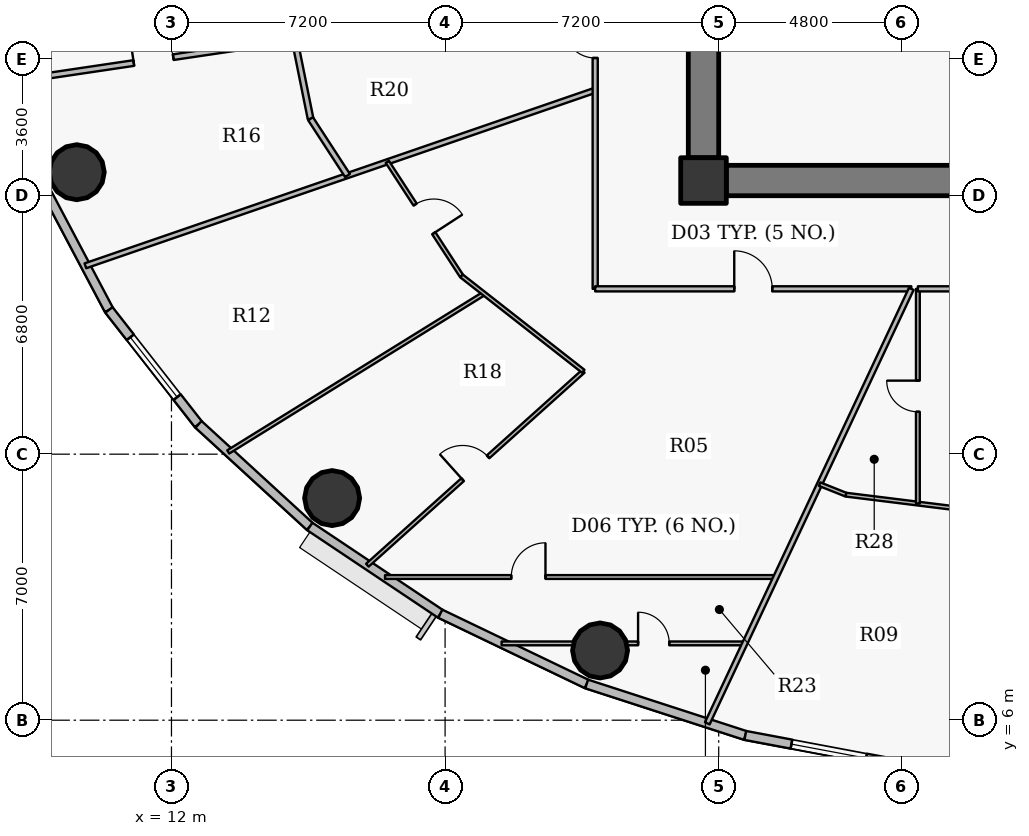
"""IFC4 building model, lengths in metres.
Left out: names, types, materials, properties, quantities, classifications, styles, units other than length and angle.
Written with IfcOpenShell. Run it as: python <this file> out.ifc"""

import sys

from ifc_helpers import new_model, si_unit, direction, frame, frame_2d, origin, origin_2d, place, context, subcontext, project, spatial, rectangle, hollow_circle, extrude, source, transform, mapped, element, fill, save


model = new_model("IFC4")
c1 = context("Model", 3, precision=1e-05, world=origin(), true_north=direction((0.0, 1.0)))
c2 = subcontext(c1, "Body", "Model", "MODEL_VIEW")
j1 = project(units=[si_unit("LENGTHUNIT", "METRE"), si_unit("PLANEANGLEUNIT", "RADIAN")], contexts=[c1])
p1 = place(None, origin())
s1 = spatial("IfcSite", under=j1, at=p1, CompositionType="ELEMENT")
p2 = place(p1, origin())
s2 = spatial("IfcBuilding", under=s1, at=p2, CompositionType="ELEMENT")
p3 = place(p2, frame((0.0, 0.0, 138.45)))
s3 = spatial("IfcBuildingStorey", under=s2, at=p3, CompositionType="ELEMENT", Elevation=138.45)
p4 = place(p3, frame((26.0, 20.2, 0.0), z_axis=(0.0, 0.0, 1.0), x_axis=(1.0, 0.0, 0.0)))
e1 = element("IfcColumn", 1, at=p4, inside=s3, PredefinedType="COLUMN", context=c2, shape_type="SweptSolid", body=[
    extrude(rectangle(XDim=1.2, YDim=1.2, at=origin_2d()), origin(), (0.0, 0.0, 1.0), 3.75),
])
p5 = place(p3, frame((45.4, 20.2, 0.0), z_axis=(0.0, 0.0, 1.0), x_axis=(-1.0, 0.0, 0.0)))
e2 = element("IfcWall", 2, at=p5, inside=s3, PredefinedType="SHEAR", context=c2, shape_type="SweptSolid", body=[
    extrude(rectangle(XDim=18.8, YDim=0.8, at=frame_2d((9.4, 0.0))), origin(), (0.0, 0.0, 1.0), 2.95),
])
p6 = place(p5, frame((10.15, 0.0, 0.0)))
e3 = element("IfcOpeningElement", 3, at=p6, cuts=e2, PredefinedType="OPENING", context=c2, shape_type="SweptSolid", body=[
    extrude(rectangle(XDim=1.15, YDim=2.15, at=origin_2d()), frame((0.575, 0.41, 1.075), z_axis=(0.0, -1.0, 0.0), x_axis=(1.0, 0.0, 0.0)), (0.0, 0.0, 1.0), 0.82),
])
p7 = place(p3, frame((26.0, 20.8, 0.0), z_axis=(0.0, 0.0, 1.0), x_axis=(0.0, 1.0, 0.0)))
e4 = element("IfcWall", 4, at=p7, inside=s3, PredefinedType="SHEAR", context=c2, shape_type="SweptSolid", body=[
    extrude(rectangle(XDim=12.4, YDim=0.8, at=frame_2d((6.2, 0.0))), origin(), (0.0, 0.0, 1.0), 2.95),
])
p8 = place(p7, frame((5.79, 0.0, 0.0)))
e5 = element("IfcOpeningElement", 5, at=p8, cuts=e4, PredefinedType="OPENING", context=c2, shape_type="SweptSolid", body=[
    extrude(rectangle(XDim=0.82, YDim=2.1, at=origin_2d()), frame((0.41, 0.41, 1.05), z_axis=(0.0, -1.0, 0.0), x_axis=(1.0, 0.0, 0.0)), (0.0, 0.0, 1.0), 0.82),
])
for number, where, z_axis, x_axis in (
    (6, (9.507, 20.419, 0.0), (0.0, 0.0, 1.0), (1.0, 0.0, 0.0)),
    (7, (16.227, 11.844, 0.0), (0.0, 0.0, 1.0), (1.0, 0.0, 0.0)),
    (8, (23.278, 7.835, 0.0), (0.0, 0.0, 1.0), (1.0, 0.0, 0.0)),
):
    element("IfcColumn", number, at=place(p3, frame(where, z_axis=z_axis, x_axis=x_axis)), inside=s3, PredefinedType="COLUMN", context=c2, shape_type="SweptSolid", body=[
        extrude(hollow_circle(Radius=0.725, WallThickness=0.042, at=origin_2d()), origin(), (0.0, 0.0, 1.0), 3.75),
    ])
p9 = place(p3, frame((10.355, 16.794, 0.0), z_axis=(0.0, 0.0, 1.0), x_axis=(-0.467614004126, 0.883932770716, 0.0)))
e9 = element("IfcWall", 9, at=p9, inside=s3, PredefinedType="SOLIDWALL", context=c2, shape_type="SweptSolid", body=[
    extrude(rectangle(XDim=3.689, YDim=0.24, at=frame_2d((1.844, 0.0))), origin(), (0.0, 0.0, 1.0), 3.5),
])
p10 = place(p3, frame((12.711, 13.783, 0.0), z_axis=(0.0, 0.0, 1.0), x_axis=(-0.616272103517, 0.787533297345, 0.0)))
e10 = element("IfcWall", 10, at=p10, inside=s3, PredefinedType="SOLIDWALL", context=c2, shape_type="SweptSolid", body=[
    extrude(rectangle(XDim=3.823, YDim=0.24, at=frame_2d((1.912, 0.0))), origin(), (0.0, 0.0, 1.0), 3.5),
])
p11 = place(p10, frame((0.912, 0.0, 0.9)))
e11 = element("IfcOpeningElement", 11, at=p11, cuts=e10, PredefinedType="OPENING", context=c2, shape_type="SweptSolid", body=[
    extrude(rectangle(XDim=2.0, YDim=1.75, at=origin_2d()), frame((1.0, 0.13, 0.875), z_axis=(0.0, -1.0, 0.0), x_axis=(1.0, 0.0, 0.0)), (0.0, 0.0, 1.0), 0.26),
])
p12 = place(p3, frame((15.642, 11.097, 0.0), z_axis=(0.0, 0.0, 1.0), x_axis=(-0.737113356241, 0.675769117414, 0.0)))
e12 = element("IfcWall", 12, at=p12, inside=s3, PredefinedType="SOLIDWALL", context=c2, shape_type="SweptSolid", body=[
    extrude(rectangle(XDim=3.976, YDim=0.24, at=frame_2d((1.988, 0.0))), origin(), (0.0, 0.0, 1.0), 3.5),
])
p13 = place(p3, frame((19.075, 8.801, 0.0), z_axis=(0.0, 0.0, 1.0), x_axis=(-0.831221811447, 0.555940914284, 0.0)))
e13 = element("IfcWall", 13, at=p13, inside=s3, PredefinedType="SOLIDWALL", context=c2, shape_type="SweptSolid", body=[
    extrude(rectangle(XDim=4.13, YDim=0.24, at=frame_2d((2.065, 0.0))), origin(), (0.0, 0.0, 1.0), 3.5),
])
p14 = place(p3, frame((22.926, 6.953, 0.0), z_axis=(0.0, 0.0, 1.0), x_axis=(-0.901589935876, 0.432591709962, 0.0)))
e14 = element("IfcWall", 14, at=p14, inside=s3, PredefinedType="SOLIDWALL", context=c2, shape_type="SweptSolid", body=[
    extrude(rectangle(XDim=4.272, YDim=0.24, at=frame_2d((2.136, 0.0))), origin(), (0.0, 0.0, 1.0), 3.5),
])
p15 = place(p3, frame((27.1, 5.599, 0.0), z_axis=(0.0, 0.0, 1.0), x_axis=(-0.951211346073, 0.308540070495, 0.0)))
e15 = element("IfcWall", 15, at=p15, inside=s3, PredefinedType="SOLIDWALL", context=c2, shape_type="SweptSolid", body=[
    extrude(rectangle(XDim=4.388, YDim=0.24, at=frame_2d((2.194, 0.0))), origin(), (0.0, 0.0, 1.0), 3.5),
])
p16 = place(p3, frame((31.494, 4.773, 0.0), z_axis=(0.0, 0.0, 1.0), x_axis=(-0.982789252177, 0.184730305596, 0.0)))
e16 = element("IfcWall", 16, at=p16, inside=s3, PredefinedType="SOLIDWALL", context=c2, shape_type="SweptSolid", body=[
    extrude(rectangle(XDim=4.471, YDim=0.24, at=frame_2d((2.235, 0.0))), origin(), (0.0, 0.0, 1.0), 3.5),
])
p17 = place(p16, frame((1.236, 0.0, 0.9)))
e17 = element("IfcOpeningElement", 17, at=p17, cuts=e16, PredefinedType="OPENING", context=c2, shape_type="SweptSolid", body=[
    extrude(rectangle(XDim=2.0, YDim=1.75, at=origin_2d()), frame((1.0, 0.13, 0.875), z_axis=(0.0, -1.0, 0.0), x_axis=(1.0, 0.0, 0.0)), (0.0, 0.0, 1.0), 0.26),
])
p18 = place(p3, frame((7.779, 22.812, 0.0), z_axis=(0.0, 0.0, 1.0), x_axis=(0.989169524168, 0.146777561148, 0.0)))
e18 = element("IfcWall", 18, at=p18, inside=s3, PredefinedType="PARTITIONING", context=c2, shape_type="SweptSolid", body=[
    extrude(rectangle(XDim=15.539, YDim=0.15, at=frame_2d((7.77, 0.0))), origin(), (0.0, 0.0, 1.0), 2.935),
])
p19 = place(p18, frame((3.265, 0.0, 0.0)))
e19 = element("IfcOpeningElement", 19, at=p19, cuts=e18, PredefinedType="OPENING", context=c2, shape_type="SweptSolid", body=[
    extrude(rectangle(XDim=1.05, YDim=2.15, at=origin_2d()), frame((0.525, 0.085, 1.075), z_axis=(0.0, -1.0, 0.0), x_axis=(1.0, 0.0, 0.0)), (0.0, 0.0, 1.0), 0.17),
])
p20 = place(p3, frame((9.735, 17.956, 0.0), z_axis=(0.0, 0.0, 1.0), x_axis=(0.945515704768, 0.325576491836, 0.0)))
e20 = element("IfcWall", 20, at=p20, inside=s3, PredefinedType="PARTITIONING", context=c2, shape_type="SweptSolid", body=[
    extrude(rectangle(XDim=14.188, YDim=0.135, at=frame_2d((7.094, 0.0))), origin(), (0.0, 0.0, 1.0), 2.935),
])
p21 = place(p3, frame((13.494, 13.059, 0.0), z_axis=(0.0, 0.0, 1.0), x_axis=(0.850110644983, 0.526604112486, 0.0)))
e21 = element("IfcWall", 21, at=p21, inside=s3, PredefinedType="PARTITIONING", context=c2, shape_type="SweptSolid", body=[
    extrude(rectangle(XDim=7.916, YDim=0.1, at=frame_2d((3.958, 0.0))), origin(), (0.0, 0.0, 1.0), 2.935),
])
p22 = place(p3, frame((15.237, 23.919, 0.0), z_axis=(0.0, 0.0, 1.0), x_axis=(0.198269330309, -0.98014757698, 0.0)))
e22 = element("IfcWall", 22, at=p22, inside=s3, PredefinedType="PARTITIONING", context=c2, shape_type="SweptSolid", body=[
    extrude(rectangle(XDim=2.136, YDim=0.15, at=frame_2d((1.068, 0.0))), origin(), (0.0, 0.0, 1.0), 2.935),
])
p23 = place(p3, frame((15.661, 21.825, 0.0), z_axis=(0.0, 0.0, 1.0), x_axis=(0.54543603077, -0.838152454114, 0.0)))
e23 = element("IfcWall", 23, at=p23, inside=s3, PredefinedType="PARTITIONING", context=c2, shape_type="SweptSolid", body=[
    extrude(rectangle(XDim=1.782, YDim=0.15, at=frame_2d((0.891, 0.0))), origin(), (0.0, 0.0, 1.0), 2.935),
])
p24 = place(p3, frame((17.155, 10.078, 0.0), z_axis=(0.0, 0.0, 1.0), x_axis=(0.744051955022, 0.668121761528, 0.0)))
e24 = element("IfcWall", 24, at=p24, inside=s3, PredefinedType="PARTITIONING", context=c2, shape_type="SweptSolid", body=[
    extrude(rectangle(XDim=7.636, YDim=0.1, at=frame_2d((3.818, 0.0))), origin(), (0.0, 0.0, 1.0), 2.935),
])
p25 = place(p24, frame((3.368, 0.0, 0.0)))
e25 = element("IfcOpeningElement", 25, at=p25, cuts=e24, PredefinedType="OPENING", context=c2, shape_type="SweptSolid", body=[
    extrude(rectangle(XDim=0.9, YDim=2.1, at=origin_2d()), frame((0.45, 0.06, 1.05), z_axis=(0.0, -1.0, 0.0), x_axis=(1.0, 0.0, 0.0)), (0.0, 0.0, 1.0), 0.12),
])
p26 = place(p3, frame((17.62, 9.768, 0.0), z_axis=(0.0, 0.0, 1.0), x_axis=(1.0, 0.0, 0.0)))
e26 = element("IfcWall", 26, at=p26, inside=s3, PredefinedType="PARTITIONING", context=c2, shape_type="SweptSolid", body=[
    extrude(rectangle(XDim=10.288, YDim=0.1, at=frame_2d((5.144, 0.0))), origin(), (0.0, 0.0, 1.0), 2.935),
])
p27 = place(p26, frame((3.322, 0.0, 0.0)))
e27 = element("IfcOpeningElement", 27, at=p27, cuts=e26, PredefinedType="OPENING", context=c2, shape_type="SweptSolid", body=[
    extrude(rectangle(XDim=0.9, YDim=2.1, at=origin_2d()), frame((0.45, 0.06, 1.05), z_axis=(0.0, -1.0, 0.0), x_axis=(1.0, 0.0, 0.0)), (0.0, 0.0, 1.0), 0.12),
])
p28 = place(p3, frame((17.68, 20.692, 0.0), z_axis=(0.0, 0.0, 1.0), x_axis=(0.545371539428, -0.838194418964, 0.0)))
e28 = element("IfcWall", 28, at=p28, inside=s3, PredefinedType="PARTITIONING", context=c2, shape_type="SweptSolid", body=[
    extrude(rectangle(XDim=3.583, YDim=0.1, at=frame_2d((1.791, 0.0))), origin(), (0.0, 0.0, 1.0), 3.5),
])
p29 = place(p28, frame((1.341, 0.0, 0.0)))
e29 = element("IfcOpeningElement", 29, at=p29, cuts=e28, PredefinedType="OPENING", context=c2, shape_type="SweptSolid", body=[
    extrude(rectangle(XDim=0.9, YDim=2.1, at=origin_2d()), frame((0.45, 0.06, 1.05), z_axis=(0.0, -1.0, 0.0), x_axis=(1.0, 0.0, 0.0)), (0.0, 0.0, 1.0), 0.12),
])
p30 = place(p3, frame((19.634, 17.689, 0.0), z_axis=(0.0, 0.0, 1.0), x_axis=(0.787341639438, -0.616516944461, 0.0)))
e30 = element("IfcWall", 30, at=p30, inside=s3, PredefinedType="PARTITIONING", context=c2, shape_type="SweptSolid", body=[
    extrude(rectangle(XDim=4.069, YDim=0.1, at=frame_2d((2.034, 0.0))), origin(), (0.0, 0.0, 1.0), 2.935),
])
p31 = place(p3, frame((20.688, 8.021, 0.0), z_axis=(0.0, 0.0, 1.0), x_axis=(1.0, 0.0, 0.0)))
e31 = element("IfcWall", 31, at=p31, inside=s3, PredefinedType="PARTITIONING", context=c2, shape_type="SweptSolid", body=[
    extrude(rectangle(XDim=6.399, YDim=0.1, at=frame_2d((3.2, 0.0))), origin(), (0.0, 0.0, 1.0), 2.935),
])
p32 = place(p31, frame((3.591, 0.0, 0.0)))
e32 = element("IfcOpeningElement", 32, at=p32, cuts=e31, PredefinedType="OPENING", context=c2, shape_type="SweptSolid", body=[
    extrude(rectangle(XDim=0.82, YDim=2.1, at=origin_2d()), frame((0.41, 0.06, 1.05), z_axis=(0.0, -1.0, 0.0), x_axis=(1.0, 0.0, 0.0)), (0.0, 0.0, 1.0), 0.12),
])
p33 = place(p3, frame((23.15, 17.35, 0.0), z_axis=(0.0, 0.0, 1.0), x_axis=(0.0, 1.0, 0.0)))
e33 = element("IfcWall", 33, at=p33, inside=s3, PredefinedType="PARTITIONING", context=c2, shape_type="SweptSolid", body=[
    extrude(rectangle(XDim=19.3, YDim=0.135, at=frame_2d((9.65, 0.0))), origin(), (0.0, 0.0, 1.0), 2.935),
])
p34 = place(p33, frame((11.733, 0.0, 0.0)))
e34 = element("IfcOpeningElement", 34, at=p34, cuts=e33, PredefinedType="OPENING", context=c2, shape_type="SweptSolid", body=[
    extrude(rectangle(XDim=1.05, YDim=2.15, at=origin_2d()), frame((0.525, 0.078, 1.075), z_axis=(0.0, -1.0, 0.0), x_axis=(1.0, 0.0, 0.0)), (0.0, 0.0, 1.0), 0.155),
])
p35 = place(p33, frame((6.074, 0.0, 0.0)))
e35 = element("IfcOpeningElement", 35, at=p35, cuts=e33, PredefinedType="OPENING", context=c2, shape_type="SweptSolid", body=[
    extrude(rectangle(XDim=0.82, YDim=2.1, at=origin_2d()), frame((0.41, 0.078, 1.05), z_axis=(0.0, -1.0, 0.0), x_axis=(1.0, 0.0, 0.0)), (0.0, 0.0, 1.0), 0.155),
])
p36 = place(p3, frame((23.15, 17.35, 0.0), z_axis=(0.0, 0.0, 1.0), x_axis=(1.0, 0.0, 0.0)))
e36 = element("IfcWall", 36, at=p36, inside=s3, PredefinedType="PARTITIONING", context=c2, shape_type="SweptSolid", body=[
    extrude(rectangle(XDim=8.318, YDim=0.135, at=frame_2d((4.159, 0.0))), origin(), (0.0, 0.0, 1.0), 2.935),
])
p37 = place(p36, frame((3.659, 0.0, 0.0)))
e37 = element("IfcOpeningElement", 37, at=p37, cuts=e36, PredefinedType="OPENING", context=c2, shape_type="SweptSolid", body=[
    extrude(rectangle(XDim=1.0, YDim=2.15, at=origin_2d()), frame((0.5, 0.078, 1.075), z_axis=(0.0, -1.0, 0.0), x_axis=(1.0, 0.0, 0.0)), (0.0, 0.0, 1.0), 0.155),
])
p38 = place(p3, frame((26.1, 5.918, 0.0), z_axis=(0.0, 0.0, 1.0), x_axis=(0.425072644526, 0.905159238408, 0.0)))
e38 = element("IfcWall", 38, at=p38, inside=s3, PredefinedType="PARTITIONING", context=c2, shape_type="SweptSolid", body=[
    extrude(rectangle(XDim=12.63, YDim=0.135, at=frame_2d((6.315, 0.0))), origin(), (0.0, 0.0, 1.0), 2.935),
])
p39 = place(p3, frame((29.055, 12.211, 0.0), z_axis=(0.0, 0.0, 1.0), x_axis=(0.928859514795, -0.370432182423, 0.0)))
e39 = element("IfcWall", 39, at=p39, inside=s3, PredefinedType="PARTITIONING", context=c2, shape_type="SweptSolid", body=[
    extrude(rectangle(XDim=0.747, YDim=0.1, at=frame_2d((0.374, 0.0))), origin(), (0.0, 0.0, 1.0), 3.5),
])
p40 = place(p3, frame((29.749, 11.934, 0.0), z_axis=(0.0, 0.0, 1.0), x_axis=(0.992395485088, -0.123090215599, 0.0)))
e40 = element("IfcWall", 40, at=p40, inside=s3, PredefinedType="PARTITIONING", context=c2, shape_type="SweptSolid", body=[
    extrude(rectangle(XDim=6.299, YDim=0.1, at=frame_2d((3.15, 0.0))), origin(), (0.0, 0.0, 1.0), 2.935),
])
p41 = place(p40, frame((2.905, 0.0, 0.0)))
e41 = element("IfcOpeningElement", 41, at=p41, cuts=e40, PredefinedType="OPENING", context=c2, shape_type="SweptSolid", body=[
    extrude(rectangle(XDim=0.9, YDim=2.1, at=origin_2d()), frame((0.45, 0.06, 1.05), z_axis=(0.0, -1.0, 0.0), x_axis=(1.0, 0.0, 0.0)), (0.0, 0.0, 1.0), 0.12),
])
p42 = place(p3, frame((31.641, 11.7, 0.0), z_axis=(0.0, 0.0, 1.0), x_axis=(0.0, 1.0, 0.0)))
e42 = element("IfcWall", 42, at=p42, inside=s3, PredefinedType="PARTITIONING", context=c2, shape_type="SweptSolid", body=[
    extrude(rectangle(XDim=5.65, YDim=0.1, at=frame_2d((2.825, 0.0))), origin(), (0.0, 0.0, 1.0), 3.5),
])
p43 = place(p42, frame((2.415, 0.0, 0.0)))
e43 = element("IfcOpeningElement", 43, at=p43, cuts=e42, PredefinedType="OPENING", context=c2, shape_type="SweptSolid", body=[
    extrude(rectangle(XDim=0.82, YDim=2.1, at=origin_2d()), frame((0.41, 0.06, 1.05), z_axis=(0.0, -1.0, 0.0), x_axis=(1.0, 0.0, 0.0)), (0.0, 0.0, 1.0), 0.12),
])
p44 = place(p3, frame((31.641, 17.35, 0.0), z_axis=(0.0, 0.0, 1.0), x_axis=(1.0, 0.0, 0.0)))
e44 = element("IfcWall", 44, at=p44, inside=s3, PredefinedType="PARTITIONING", context=c2, shape_type="SweptSolid", body=[
    extrude(rectangle(XDim=1.882, YDim=0.135, at=frame_2d((0.941, 0.0))), origin(), (0.0, 0.0, 1.0), 3.5),
])
p45 = place(p3, frame((25.6, 20.79, 0.0), z_axis=(0.0, 0.0, 1.0), x_axis=(0.0, -1.0, 0.0)))
e45 = element("IfcWall", 45, at=p45, inside=s3, PredefinedType="PARTITIONING", context=c2, shape_type="SweptSolid", body=[
    extrude(rectangle(XDim=0.99, YDim=0.135, at=frame_2d((0.495, 0.0))), origin(), (0.0, 0.0, 1.0), 3.5),
])
p46 = place(p3, frame((25.907, 19.8, 0.0), z_axis=(0.0, 0.0, 1.0), x_axis=(1.0, 0.0, 0.0)))
e46 = element("IfcWall", 46, at=p46, inside=s3, PredefinedType="PARTITIONING", context=c2, shape_type="SweptSolid", body=[
    extrude(rectangle(XDim=0.683, YDim=0.135, at=frame_2d((0.341, 0.0))), origin(), (0.0, 0.0, 1.0), 2.935),
])
m1 = source(origin(), c2, "Body", "SweptSolid", [
    extrude(rectangle(XDim=2.0, YDim=1.75, at=origin_2d()), frame((1.0, 0.03, 0.875), z_axis=(0.0, -1.0, 0.0), x_axis=(1.0, 0.0, 0.0)), (0.0, 0.0, 1.0), 0.06),
])
p47 = place(p11, origin())
e47 = element("IfcWindow", 47, at=p47, inside=s3, PartitioningType="DOUBLE_PANEL_VERTICAL", PredefinedType="WINDOW", context=c2, shape_type="MappedRepresentation", body=[
    mapped(m1, transform((0.0, 0.0, 0.0), x_axis=(1.0, 0.0, 0.0), y_axis=(0.0, 1.0, 0.0), z_axis=(0.0, 0.0, 1.0), scale=1.0)),
])
fill(e11, e47)
p48 = place(p17, origin())
e48 = element("IfcWindow", 48, at=p48, inside=s3, PartitioningType="DOUBLE_PANEL_VERTICAL", PredefinedType="WINDOW", context=c2, shape_type="MappedRepresentation", body=[
    mapped(m1, transform((0.0, 0.0, 0.0), x_axis=(1.0, 0.0, 0.0), y_axis=(0.0, 1.0, 0.0), z_axis=(0.0, 0.0, 1.0), scale=1.0)),
])
fill(e17, e48)
m2 = source(origin(), c2, "Body", "SweptSolid", [
    extrude(rectangle(XDim=1.0, YDim=2.15, at=origin_2d()), frame((0.5, 0.025, 1.075), z_axis=(0.0, -1.0, 0.0), x_axis=(1.0, 0.0, 0.0)), (0.0, 0.0, 1.0), 0.05),
])
p49 = place(p37, origin())
e49 = element("IfcDoor", 49, at=p49, inside=s3, OperationType="SINGLE_SWING_LEFT", PredefinedType="DOOR", context=c2, shape_type="MappedRepresentation", body=[
    mapped(m2, transform((0.0, 0.0, 0.0), x_axis=(1.0, 0.0, 0.0), y_axis=(0.0, 1.0, 0.0), z_axis=(0.0, 0.0, 1.0), scale=1.0)),
])
fill(e37, e49)
m3 = source(origin(), c2, "Body", "SweptSolid", [
    extrude(rectangle(XDim=0.9, YDim=2.1, at=origin_2d()), frame((0.45, 0.025, 1.05), z_axis=(0.0, -1.0, 0.0), x_axis=(1.0, 0.0, 0.0)), (0.0, 0.0, 1.0), 0.05),
])
p50 = place(p29, origin())
e50 = element("IfcDoor", 50, at=p50, inside=s3, OperationType="SINGLE_SWING_RIGHT", PredefinedType="DOOR", context=c2, shape_type="MappedRepresentation", body=[
    mapped(m3, transform((0.0, 0.0, 0.0), x_axis=(1.0, 0.0, 0.0), y_axis=(0.0, 1.0, 0.0), z_axis=(0.0, 0.0, 1.0), scale=1.0)),
])
fill(e29, e50)
p51 = place(p25, origin())
e51 = element("IfcDoor", 51, at=p51, inside=s3, OperationType="SINGLE_SWING_LEFT", PredefinedType="DOOR", context=c2, shape_type="MappedRepresentation", body=[
    mapped(m3, transform((0.0, 0.0, 0.0), x_axis=(1.0, 0.0, 0.0), y_axis=(0.0, 1.0, 0.0), z_axis=(0.0, 0.0, 1.0), scale=1.0)),
])
fill(e25, e51)
p52 = place(p27, origin())
e52 = element("IfcDoor", 52, at=p52, inside=s3, OperationType="SINGLE_SWING_RIGHT", PredefinedType="DOOR", context=c2, shape_type="MappedRepresentation", body=[
    mapped(m3, transform((0.0, 0.0, 0.0), x_axis=(1.0, 0.0, 0.0), y_axis=(0.0, 1.0, 0.0), z_axis=(0.0, 0.0, 1.0), scale=1.0)),
])
fill(e27, e52)
m4 = source(origin(), c2, "Body", "SweptSolid", [
    extrude(rectangle(XDim=0.82, YDim=2.1, at=origin_2d()), frame((0.41, 0.025, 1.05), z_axis=(0.0, -1.0, 0.0), x_axis=(1.0, 0.0, 0.0)), (0.0, 0.0, 1.0), 0.05),
])
p53 = place(p32, origin())
e53 = element("IfcDoor", 53, at=p53, inside=s3, OperationType="SINGLE_SWING_LEFT", PredefinedType="DOOR", context=c2, shape_type="MappedRepresentation", body=[
    mapped(m4, transform((0.0, 0.0, 0.0), x_axis=(1.0, 0.0, 0.0), y_axis=(0.0, 1.0, 0.0), z_axis=(0.0, 0.0, 1.0), scale=1.0)),
])
fill(e32, e53)
p54 = place(p43, origin())
e54 = element("IfcDoor", 54, at=p54, inside=s3, OperationType="SINGLE_SWING_RIGHT", PredefinedType="DOOR", context=c2, shape_type="MappedRepresentation", body=[
    mapped(m4, transform((0.0, 0.0, 0.0), x_axis=(1.0, 0.0, 0.0), y_axis=(0.0, 1.0, 0.0), z_axis=(0.0, 0.0, 1.0), scale=1.0)),
])
fill(e43, e54)
p55 = place(p35, origin())
e55 = element("IfcDoor", 55, at=p55, inside=s3, OperationType="SINGLE_SWING_RIGHT", PredefinedType="DOOR", context=c2, shape_type="MappedRepresentation", body=[
    mapped(m4, transform((0.0, 0.0, 0.0), x_axis=(1.0, 0.0, 0.0), y_axis=(0.0, 1.0, 0.0), z_axis=(0.0, 0.0, 1.0), scale=1.0)),
])
fill(e35, e55)
m5 = source(origin(), c2, "Body", "SweptSolid", [
    extrude(rectangle(XDim=1.05, YDim=2.15, at=origin_2d()), frame((0.525, 0.025, 1.075), z_axis=(0.0, -1.0, 0.0), x_axis=(1.0, 0.0, 0.0)), (0.0, 0.0, 1.0), 0.05),
])
p56 = place(p19, origin())
e56 = element("IfcDoor", 56, at=p56, inside=s3, OperationType="SINGLE_SWING_LEFT", PredefinedType="DOOR", context=c2, shape_type="MappedRepresentation", body=[
    mapped(m5, transform((0.0, 0.0, 0.0), x_axis=(1.0, 0.0, 0.0), y_axis=(0.0, 1.0, 0.0), z_axis=(0.0, 0.0, 1.0), scale=1.0)),
])
fill(e19, e56)
save(model, sys.argv[1])
